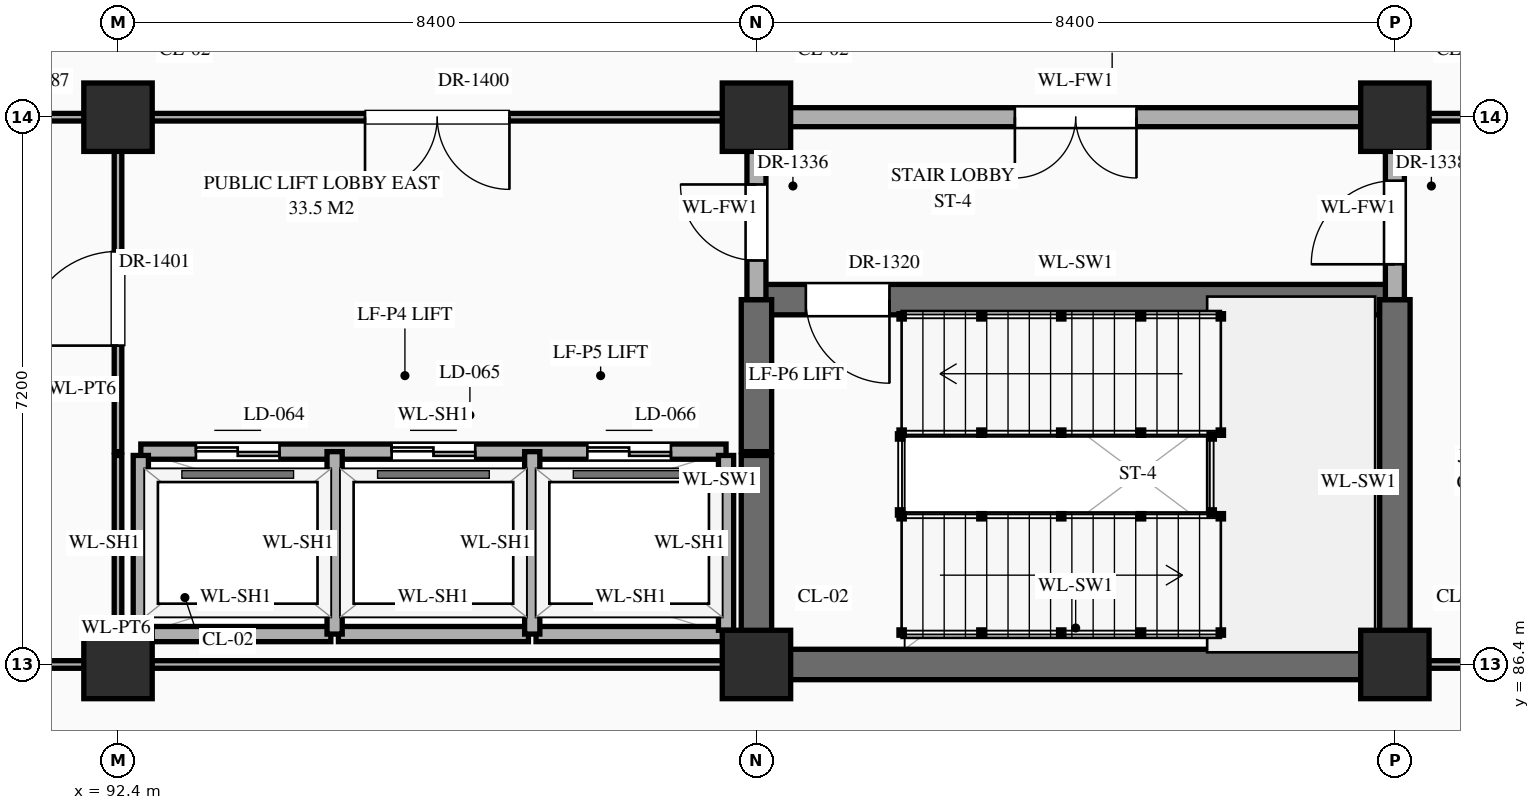
"""IFC4 building model, lengths in metres.
Left out: names, types, materials, properties, quantities, classifications, styles, units other than length and angle.
Written with IfcOpenShell. Run it as: python <this file> out.ifc"""

import sys

from ifc_helpers import new_model, si_unit, direction, frame, frame_2d, origin, origin_2d, place, context, subcontext, project, spatial, rectangle, extrude, element, fill, save


model = new_model("IFC4")
c1 = context("Model", 3, precision=1e-05, world=origin(), true_north=direction((0.0, 1.0)))
c2 = subcontext(c1, "Body", "Model", "MODEL_VIEW")
j1 = project(units=[si_unit("LENGTHUNIT", "METRE"), si_unit("PLANEANGLEUNIT", "RADIAN")], contexts=[c1])
p1 = place(None, origin())
s1 = spatial("IfcSite", under=j1, at=p1, CompositionType="ELEMENT")
p2 = place(p1, origin())
s2 = spatial("IfcBuilding", under=s1, at=p2, CompositionType="ELEMENT")
p3 = place(p2, frame((0.0, 0.0, 10.8)))
s3 = spatial("IfcBuildingStorey", under=s2, at=p3, CompositionType="ELEMENT", Elevation=10.8)
for number, where, z_axis, x_axis in (
    (1, (92.4, 86.4, 0.0), (0.0, 0.0, 1.0), (1.0, 0.0, 0.0)),
    (2, (92.4, 93.6, 0.0), (0.0, 0.0, 1.0), (1.0, 0.0, 0.0)),
    (3, (100.8, 86.4, 0.0), (0.0, 0.0, 1.0), (1.0, 0.0, 0.0)),
    (4, (100.8, 93.6, 0.0), (0.0, 0.0, 1.0), (1.0, 0.0, 0.0)),
    (5, (109.2, 86.4, 0.0), (0.0, 0.0, 1.0), (1.0, 0.0, 0.0)),
    (6, (109.2, 93.6, 0.0), (0.0, 0.0, 1.0), (1.0, 0.0, 0.0)),
):
    element("IfcColumn", number, at=place(p3, frame(where, z_axis=z_axis, x_axis=x_axis)), inside=s3, PredefinedType="COLUMN", context=c2, shape_type="SweptSolid", body=[
        extrude(rectangle(XDim=0.9, YDim=0.9, at=origin_2d()), origin(), (0.0, 0.0, 1.0), 5.4),
    ])
p4 = place(p3, frame((84.0, 86.4, 0.0), z_axis=(0.0, 0.0, 1.0), x_axis=(1.0, 0.0, 0.0)))
e7 = element("IfcWall", 7, at=p4, inside=s3, PredefinedType="STANDARD", context=c2, shape_type="SweptSolid", body=[
    extrude(rectangle(XDim=8.4, YDim=0.1, at=frame_2d((4.2, 0.0))), origin(), (0.0, 0.0, 1.0), 4.27),
])
p5 = place(p4, frame((1.075, 0.0, 0.0)))
e8 = element("IfcOpeningElement", 8, at=p5, cuts=e7, PredefinedType="OPENING", context=c2, shape_type="SweptSolid", body=[
    extrude(rectangle(XDim=1.02, YDim=2.4, at=frame_2d((0.51, 1.2))), frame((0.0, 0.062, 0.0), z_axis=(0.0, -1.0, 0.0), x_axis=(1.0, 0.0, 0.0)), (0.0, 0.0, 1.0), 0.124),
])
p6 = place(p4, frame((3.63, 0.0, 0.0)))
e9 = element("IfcOpeningElement", 9, at=p6, cuts=e7, PredefinedType="OPENING", context=c2, shape_type="SweptSolid", body=[
    extrude(rectangle(XDim=1.14, YDim=2.4, at=frame_2d((0.57, 1.2))), frame((0.0, 0.062, 0.0), z_axis=(0.0, -1.0, 0.0), x_axis=(1.0, 0.0, 0.0)), (0.0, 0.0, 1.0), 0.124),
])
p7 = place(p4, frame((6.365, 0.0, 0.0)))
e10 = element("IfcOpeningElement", 10, at=p7, cuts=e7, PredefinedType="OPENING", context=c2, shape_type="SweptSolid", body=[
    extrude(rectangle(XDim=0.9, YDim=2.15, at=frame_2d((0.45, 1.075))), frame((0.0, 0.062, 0.0), z_axis=(0.0, -1.0, 0.0), x_axis=(1.0, 0.0, 0.0)), (0.0, 0.0, 1.0), 0.124),
])
p8 = place(p3, frame((92.45, 86.4, 0.0), z_axis=(0.0, 0.0, 1.0), x_axis=(1.0, 0.0, 0.0)))
e11 = element("IfcWall", 11, at=p8, inside=s3, PredefinedType="STANDARD", context=c2, shape_type="SweptSolid", body=[
    extrude(rectangle(XDim=8.3, YDim=0.1, at=frame_2d((4.15, 0.0))), origin(), (0.0, 0.0, 1.0), 4.27),
])
p9 = place(p3, frame((100.8, 86.4, 0.0), z_axis=(0.0, 0.0, 1.0), x_axis=(1.0, 0.0, 0.0)))
e12 = element("IfcWall", 12, at=p9, inside=s3, PredefinedType="SHEAR", context=c2, shape_type="SweptSolid", body=[
    extrude(rectangle(XDim=8.4, YDim=0.4, at=frame_2d((4.2, 0.0))), origin(), (0.0, 0.0, 1.0), 5.12),
])
p10 = place(p3, frame((109.2, 86.4, 0.0), z_axis=(0.0, 0.0, 1.0), x_axis=(1.0, 0.0, 0.0)))
e13 = element("IfcWall", 13, at=p10, inside=s3, PredefinedType="STANDARD", context=c2, shape_type="SweptSolid", body=[
    extrude(rectangle(XDim=8.4, YDim=0.1, at=frame_2d((4.2, 0.0))), origin(), (0.0, 0.0, 1.0), 4.27),
])
p11 = place(p10, frame((1.125, 0.0, 0.0)))
e14 = element("IfcOpeningElement", 14, at=p11, cuts=e13, PredefinedType="OPENING", context=c2, shape_type="SweptSolid", body=[
    extrude(rectangle(XDim=0.92, YDim=2.15, at=frame_2d((0.46, 1.075))), frame((0.0, 0.062, 0.0), z_axis=(0.0, -1.0, 0.0), x_axis=(1.0, 0.0, 0.0)), (0.0, 0.0, 1.0), 0.124),
])
p12 = place(p10, frame((3.7, 0.0, 0.0)))
e15 = element("IfcOpeningElement", 15, at=p12, cuts=e13, PredefinedType="OPENING", context=c2, shape_type="SweptSolid", body=[
    extrude(rectangle(XDim=1.0, YDim=2.25, at=frame_2d((0.5, 1.125))), frame((0.0, 0.062, 0.0), z_axis=(0.0, -1.0, 0.0), x_axis=(1.0, 0.0, 0.0)), (0.0, 0.0, 1.0), 0.124),
])
p13 = place(p10, frame((6.295, 0.0, 0.0)))
e16 = element("IfcOpeningElement", 16, at=p13, cuts=e13, PredefinedType="OPENING", context=c2, shape_type="SweptSolid", body=[
    extrude(rectangle(XDim=1.04, YDim=2.2, at=frame_2d((0.52, 1.1))), frame((0.0, 0.062, 0.0), z_axis=(0.0, -1.0, 0.0), x_axis=(1.0, 0.0, 0.0)), (0.0, 0.0, 1.0), 0.124),
])
for number, where, z_axis, x_axis in (
    (17, (92.7, 86.8, 0.0), (0.0, 0.0, 1.0), (1.0, 0.0, 0.0)),
    (18, (95.3, 86.8, 0.0), (0.0, 0.0, 1.0), (1.0, 0.0, 0.0)),
    (19, (97.9, 86.8, 0.0), (0.0, 0.0, 1.0), (1.0, 0.0, 0.0)),
):
    element("IfcWall", number, at=place(p3, frame(where, z_axis=z_axis, x_axis=x_axis)), inside=s3, PredefinedType="STANDARD", context=c2, shape_type="SweptSolid", body=[
        extrude(rectangle(XDim=2.5, YDim=0.2, at=frame_2d((1.25, 0.0))), origin(), (0.0, 0.0, 1.0), 5.12),
    ])
p14 = place(p3, frame((92.7, 89.2, 0.0), z_axis=(0.0, 0.0, 1.0), x_axis=(1.0, 0.0, 0.0)))
e20 = element("IfcWall", 20, at=p14, inside=s3, PredefinedType="STANDARD", context=c2, shape_type="SweptSolid", body=[
    extrude(rectangle(XDim=7.7, YDim=0.2, at=frame_2d((3.85, 0.0))), origin(), (0.0, 0.0, 1.0), 5.12),
])
p15 = place(p14, frame((0.725, 0.0, 0.0)))
e21 = element("IfcOpeningElement", 21, at=p15, cuts=e20, PredefinedType="OPENING", context=c2, shape_type="SweptSolid", body=[
    extrude(rectangle(XDim=1.1, YDim=2.15, at=frame_2d((0.55, 1.075))), frame((0.0, 0.112, 0.0), z_axis=(0.0, -1.0, 0.0), x_axis=(1.0, 0.0, 0.0)), (0.0, 0.0, 1.0), 0.224),
])
p16 = place(p14, frame((3.3, 0.0, 0.0)))
e22 = element("IfcOpeningElement", 22, at=p16, cuts=e20, PredefinedType="OPENING", context=c2, shape_type="SweptSolid", body=[
    extrude(rectangle(XDim=1.1, YDim=2.15, at=frame_2d((0.55, 1.075))), frame((0.0, 0.112, 0.0), z_axis=(0.0, -1.0, 0.0), x_axis=(1.0, 0.0, 0.0)), (0.0, 0.0, 1.0), 0.224),
])
p17 = place(p14, frame((5.875, 0.0, 0.0)))
e23 = element("IfcOpeningElement", 23, at=p17, cuts=e20, PredefinedType="OPENING", context=c2, shape_type="SweptSolid", body=[
    extrude(rectangle(XDim=1.1, YDim=2.15, at=frame_2d((0.55, 1.075))), frame((0.0, 0.112, 0.0), z_axis=(0.0, -1.0, 0.0), x_axis=(1.0, 0.0, 0.0)), (0.0, 0.0, 1.0), 0.224),
])
p18 = place(p3, frame((100.8, 91.2, 0.0), z_axis=(0.0, 0.0, 1.0), x_axis=(1.0, 0.0, 0.0)))
e24 = element("IfcWall", 24, at=p18, inside=s3, PredefinedType="SHEAR", context=c2, shape_type="SweptSolid", body=[
    extrude(rectangle(XDim=8.4, YDim=0.4, at=frame_2d((4.2, 0.0))), origin(), (0.0, 0.0, 1.0), 5.12),
])
p19 = place(p18, frame((0.65, 0.0, 0.0)))
e25 = element("IfcOpeningElement", 25, at=p19, cuts=e24, PredefinedType="OPENING", context=c2, shape_type="SweptSolid", body=[
    extrude(rectangle(XDim=1.1, YDim=2.2, at=frame_2d((0.55, 1.1))), frame((0.0, 0.212, 0.0), z_axis=(0.0, -1.0, 0.0), x_axis=(1.0, 0.0, 0.0)), (0.0, 0.0, 1.0), 0.424),
])
p20 = place(p3, frame((67.2, 93.6, 0.0), z_axis=(0.0, 0.0, 1.0), x_axis=(1.0, 0.0, 0.0)))
e26 = element("IfcWall", 26, at=p20, inside=s3, PredefinedType="STANDARD", context=c2, shape_type="SweptSolid", body=[
    extrude(rectangle(XDim=33.6, YDim=0.1, at=frame_2d((16.8, 0.0))), origin(), (0.0, 0.0, 1.0), 4.27),
])
p21 = place(p20, frame((3.475, 0.0, 0.0)))
e27 = element("IfcOpeningElement", 27, at=p21, cuts=e26, PredefinedType="OPENING", context=c2, shape_type="SweptSolid", body=[
    extrude(rectangle(XDim=1.45, YDim=2.3, at=frame_2d((0.725, 1.15))), frame((0.0, 0.062, 0.0), z_axis=(0.0, -1.0, 0.0), x_axis=(1.0, 0.0, 0.0)), (0.0, 0.0, 1.0), 0.124),
])
p22 = place(p20, frame((28.45, 0.0, 0.0)))
e28 = element("IfcOpeningElement", 28, at=p22, cuts=e26, PredefinedType="OPENING", context=c2, shape_type="SweptSolid", body=[
    extrude(rectangle(XDim=1.9, YDim=2.5, at=frame_2d((0.95, 1.25))), frame((0.0, 0.062, 0.0), z_axis=(0.0, -1.0, 0.0), x_axis=(1.0, 0.0, 0.0)), (0.0, 0.0, 1.0), 0.124),
])
p23 = place(p20, frame((11.825, 0.0, 0.0)))
e29 = element("IfcOpeningElement", 29, at=p23, cuts=e26, PredefinedType="OPENING", context=c2, shape_type="SweptSolid", body=[
    extrude(rectangle(XDim=1.55, YDim=2.35, at=frame_2d((0.775, 1.175))), frame((0.0, 0.062, 0.0), z_axis=(0.0, -1.0, 0.0), x_axis=(1.0, 0.0, 0.0)), (0.0, 0.0, 1.0), 0.124),
])
p24 = place(p20, frame((17.785, 0.0, 0.0)))
e30 = element("IfcOpeningElement", 30, at=p24, cuts=e26, PredefinedType="OPENING", context=c2, shape_type="SweptSolid", body=[
    extrude(rectangle(XDim=1.2, YDim=2.35, at=frame_2d((0.6, 1.175))), frame((0.0, 0.062, 0.0), z_axis=(0.0, -1.0, 0.0), x_axis=(1.0, 0.0, 0.0)), (0.0, 0.0, 1.0), 0.124),
])
p25 = place(p20, frame((20.38, 0.0, 0.0)))
e31 = element("IfcOpeningElement", 31, at=p25, cuts=e26, PredefinedType="OPENING", context=c2, shape_type="SweptSolid", body=[
    extrude(rectangle(XDim=1.24, YDim=2.3, at=frame_2d((0.62, 1.15))), frame((0.0, 0.062, 0.0), z_axis=(0.0, -1.0, 0.0), x_axis=(1.0, 0.0, 0.0)), (0.0, 0.0, 1.0), 0.124),
])
p26 = place(p20, frame((22.975, 0.0, 0.0)))
e32 = element("IfcOpeningElement", 32, at=p26, cuts=e26, PredefinedType="OPENING", context=c2, shape_type="SweptSolid", body=[
    extrude(rectangle(XDim=1.28, YDim=2.35, at=frame_2d((0.64, 1.175))), frame((0.0, 0.062, 0.0), z_axis=(0.0, -1.0, 0.0), x_axis=(1.0, 0.0, 0.0)), (0.0, 0.0, 1.0), 0.124),
])
p27 = place(p3, frame((100.8, 93.6, 0.0), z_axis=(0.0, 0.0, 1.0), x_axis=(1.0, 0.0, 0.0)))
e33 = element("IfcWall", 33, at=p27, inside=s3, PredefinedType="STANDARD", context=c2, shape_type="SweptSolid", body=[
    extrude(rectangle(XDim=8.4, YDim=0.25, at=frame_2d((4.2, 0.0))), origin(), (0.0, 0.0, 1.0), 4.27),
])
p28 = place(p27, frame((3.4, 0.0, 0.0)))
e34 = element("IfcOpeningElement", 34, at=p28, cuts=e33, PredefinedType="OPENING", context=c2, shape_type="SweptSolid", body=[
    extrude(rectangle(XDim=1.6, YDim=2.3, at=frame_2d((0.8, 1.15))), frame((0.0, 0.137, 0.0), z_axis=(0.0, -1.0, 0.0), x_axis=(1.0, 0.0, 0.0)), (0.0, 0.0, 1.0), 0.274),
])
p29 = place(p3, frame((109.2, 93.6, 0.0), z_axis=(0.0, 0.0, 1.0), x_axis=(1.0, 0.0, 0.0)))
e35 = element("IfcWall", 35, at=p29, inside=s3, PredefinedType="STANDARD", context=c2, shape_type="SweptSolid", body=[
    extrude(rectangle(XDim=8.4, YDim=0.1, at=frame_2d((4.2, 0.0))), origin(), (0.0, 0.0, 1.0), 4.27),
])
p30 = place(p29, frame((1.115, 0.0, 0.0)))
e36 = element("IfcOpeningElement", 36, at=p30, cuts=e35, PredefinedType="OPENING", context=c2, shape_type="SweptSolid", body=[
    extrude(rectangle(XDim=0.94, YDim=2.3, at=frame_2d((0.47, 1.15))), frame((0.0, 0.062, 0.0), z_axis=(0.0, -1.0, 0.0), x_axis=(1.0, 0.0, 0.0)), (0.0, 0.0, 1.0), 0.124),
])
p31 = place(p29, frame((3.71, 0.0, 0.0)))
e37 = element("IfcOpeningElement", 37, at=p31, cuts=e35, PredefinedType="OPENING", context=c2, shape_type="SweptSolid", body=[
    extrude(rectangle(XDim=0.98, YDim=2.35, at=frame_2d((0.49, 1.175))), frame((0.0, 0.062, 0.0), z_axis=(0.0, -1.0, 0.0), x_axis=(1.0, 0.0, 0.0)), (0.0, 0.0, 1.0), 0.124),
])
p32 = place(p29, frame((6.305, 0.0, 0.0)))
e38 = element("IfcOpeningElement", 38, at=p32, cuts=e35, PredefinedType="OPENING", context=c2, shape_type="SweptSolid", body=[
    extrude(rectangle(XDim=1.02, YDim=2.4, at=frame_2d((0.51, 1.2))), frame((0.0, 0.062, 0.0), z_axis=(0.0, -1.0, 0.0), x_axis=(1.0, 0.0, 0.0)), (0.0, 0.0, 1.0), 0.124),
])
p33 = place(p3, frame((92.4, 86.45, 0.0), z_axis=(0.0, 0.0, 1.0), x_axis=(0.0, 1.0, 0.0)))
e39 = element("IfcWall", 39, at=p33, inside=s3, PredefinedType="STANDARD", context=c2, shape_type="SweptSolid", body=[
    extrude(rectangle(XDim=2.7, YDim=0.1, at=frame_2d((1.35, 0.0))), origin(), (0.0, 0.0, 1.0), 4.37),
])
p34 = place(p3, frame((92.4, 89.2, 0.0), z_axis=(0.0, 0.0, 1.0), x_axis=(0.0, 1.0, 0.0)))
e40 = element("IfcWall", 40, at=p34, inside=s3, PredefinedType="STANDARD", context=c2, shape_type="SweptSolid", body=[
    extrude(rectangle(XDim=4.4, YDim=0.1, at=frame_2d((2.2, 0.0))), origin(), (0.0, 0.0, 1.0), 4.37),
])
p35 = place(p34, frame((1.395, 0.0, 0.0)))
e41 = element("IfcOpeningElement", 41, at=p35, cuts=e40, PredefinedType="OPENING", context=c2, shape_type="SweptSolid", body=[
    extrude(rectangle(XDim=1.24, YDim=2.3, at=frame_2d((0.62, 1.15))), frame((0.0, 0.062, 0.0), z_axis=(0.0, -1.0, 0.0), x_axis=(1.0, 0.0, 0.0)), (0.0, 0.0, 1.0), 0.124),
])
p36 = place(p3, frame((92.7, 86.85, 0.0), z_axis=(0.0, 0.0, 1.0), x_axis=(0.0, 1.0, 0.0)))
e42 = element("IfcWall", 42, at=p36, inside=s3, PredefinedType="STANDARD", context=c2, shape_type="SweptSolid", body=[
    extrude(rectangle(XDim=2.3, YDim=0.2, at=frame_2d((1.15, 0.0))), origin(), (0.0, 0.0, 1.0), 5.12),
])
for number, where, z_axis, x_axis in (
    (43, (95.25, 86.8, 0.0), (0.0, 0.0, 1.0), (0.0, 1.0, 0.0)),
    (44, (97.85, 86.8, 0.0), (0.0, 0.0, 1.0), (0.0, 1.0, 0.0)),
):
    element("IfcWall", number, at=place(p3, frame(where, z_axis=z_axis, x_axis=x_axis)), inside=s3, PredefinedType="STANDARD", context=c2, shape_type="SweptSolid", body=[
        extrude(rectangle(XDim=2.4, YDim=0.2, at=frame_2d((1.2, 0.0))), origin(), (0.0, 0.0, 1.0), 5.12),
    ])
p37 = place(p3, frame((100.4, 86.85, 0.0), z_axis=(0.0, 0.0, 1.0), x_axis=(0.0, 1.0, 0.0)))
e45 = element("IfcWall", 45, at=p37, inside=s3, PredefinedType="STANDARD", context=c2, shape_type="SweptSolid", body=[
    extrude(rectangle(XDim=2.3, YDim=0.2, at=frame_2d((1.15, 0.0))), origin(), (0.0, 0.0, 1.0), 5.12),
])
p38 = place(p3, frame((100.8, 86.45, 0.0), z_axis=(0.0, 0.0, 1.0), x_axis=(0.0, 1.0, 0.0)))
e46 = element("IfcWall", 46, at=p38, inside=s3, PredefinedType="SHEAR", context=c2, shape_type="SweptSolid", body=[
    extrude(rectangle(XDim=2.7, YDim=0.4, at=frame_2d((1.35, 0.0))), origin(), (0.0, 0.0, 1.0), 5.12),
])
p39 = place(p3, frame((100.8, 89.2, 0.0), z_axis=(0.0, 0.0, 1.0), x_axis=(0.0, 1.0, 0.0)))
e47 = element("IfcWall", 47, at=p39, inside=s3, PredefinedType="SHEAR", context=c2, shape_type="SweptSolid", body=[
    extrude(rectangle(XDim=2.0, YDim=0.4, at=frame_2d((1.0, 0.0))), origin(), (0.0, 0.0, 1.0), 5.12),
])
p40 = place(p3, frame((100.8, 91.2, 0.0), z_axis=(0.0, 0.0, 1.0), x_axis=(0.0, 1.0, 0.0)))
e48 = element("IfcWall", 48, at=p40, inside=s3, PredefinedType="STANDARD", context=c2, shape_type="SweptSolid", body=[
    extrude(rectangle(XDim=2.4, YDim=0.25, at=frame_2d((1.2, 0.0))), origin(), (0.0, 0.0, 1.0), 4.37),
])
p41 = place(p40, frame((0.515, 0.0, 0.0)))
e49 = element("IfcOpeningElement", 49, at=p41, cuts=e48, PredefinedType="OPENING", context=c2, shape_type="SweptSolid", body=[
    extrude(rectangle(XDim=1.0, YDim=2.2, at=frame_2d((0.5, 1.1))), frame((0.0, 0.137, 0.0), z_axis=(0.0, -1.0, 0.0), x_axis=(1.0, 0.0, 0.0)), (0.0, 0.0, 1.0), 0.274),
])
p42 = place(p3, frame((109.2, 86.4, 0.0), z_axis=(0.0, 0.0, 1.0), x_axis=(0.0, 1.0, 0.0)))
e50 = element("IfcWall", 50, at=p42, inside=s3, PredefinedType="SHEAR", context=c2, shape_type="SweptSolid", body=[
    extrude(rectangle(XDim=4.8, YDim=0.4, at=frame_2d((2.4, 0.0))), origin(), (0.0, 0.0, 1.0), 5.12),
])
p43 = place(p3, frame((109.2, 91.2, 0.0), z_axis=(0.0, 0.0, 1.0), x_axis=(0.0, 1.0, 0.0)))
e51 = element("IfcWall", 51, at=p43, inside=s3, PredefinedType="STANDARD", context=c2, shape_type="SweptSolid", body=[
    extrude(rectangle(XDim=2.4, YDim=0.25, at=frame_2d((1.2, 0.0))), origin(), (0.0, 0.0, 1.0), 4.37),
])
p44 = place(p43, frame((0.465, 0.0, 0.0)))
e52 = element("IfcOpeningElement", 52, at=p44, cuts=e51, PredefinedType="OPENING", context=c2, shape_type="SweptSolid", body=[
    extrude(rectangle(XDim=1.1, YDim=2.2, at=frame_2d((0.55, 1.1))), frame((0.0, 0.137, 0.0), z_axis=(0.0, -1.0, 0.0), x_axis=(1.0, 0.0, 0.0)), (0.0, 0.0, 1.0), 0.274),
])
p45 = place(p15, origin())
e53 = element("IfcDoor", 53, at=p45, inside=s3, OperationType="DOUBLE_DOOR_SLIDING", PredefinedType="DOOR", context=c2, shape_type="SweptSolid", body=[
    extrude(rectangle(XDim=1.1, YDim=2.15, at=frame_2d((0.55, 1.075))), frame((0.0, 0.025, 0.0), z_axis=(0.0, -1.0, 0.0), x_axis=(1.0, 0.0, 0.0)), (0.0, 0.0, 1.0), 0.05),
])
fill(e21, e53)
p46 = place(p16, origin())
e54 = element("IfcDoor", 54, at=p46, inside=s3, OperationType="DOUBLE_DOOR_SLIDING", PredefinedType="DOOR", context=c2, shape_type="SweptSolid", body=[
    extrude(rectangle(XDim=1.1, YDim=2.15, at=frame_2d((0.55, 1.075))), frame((0.0, 0.025, 0.0), z_axis=(0.0, -1.0, 0.0), x_axis=(1.0, 0.0, 0.0)), (0.0, 0.0, 1.0), 0.05),
])
fill(e22, e54)
p47 = place(p17, origin())
e55 = element("IfcDoor", 55, at=p47, inside=s3, OperationType="DOUBLE_DOOR_SLIDING", PredefinedType="DOOR", context=c2, shape_type="SweptSolid", body=[
    extrude(rectangle(XDim=1.1, YDim=2.15, at=frame_2d((0.55, 1.075))), frame((0.0, 0.025, 0.0), z_axis=(0.0, -1.0, 0.0), x_axis=(1.0, 0.0, 0.0)), (0.0, 0.0, 1.0), 0.05),
])
fill(e23, e55)
p48 = place(p19, frame((1.1, 0.0, 0.0), z_axis=(0.0, 0.0, 1.0), x_axis=(-1.0, 0.0, 0.0)))
e56 = element("IfcDoor", 56, at=p48, inside=s3, OperationType="SINGLE_SWING_LEFT", PredefinedType="DOOR", context=c2, shape_type="SweptSolid", body=[
    extrude(rectangle(XDim=1.1, YDim=2.2, at=frame_2d((0.55, 1.1))), frame((0.0, 0.025, 0.0), z_axis=(0.0, -1.0, 0.0), x_axis=(1.0, 0.0, 0.0)), (0.0, 0.0, 1.0), 0.05),
])
fill(e25, e56)
p49 = place(p41, origin())
e57 = element("IfcDoor", 57, at=p49, inside=s3, OperationType="SINGLE_SWING_RIGHT", PredefinedType="DOOR", context=c2, shape_type="SweptSolid", body=[
    extrude(rectangle(XDim=1.0, YDim=2.2, at=frame_2d((0.5, 1.1))), frame((0.0, 0.025, 0.0), z_axis=(0.0, -1.0, 0.0), x_axis=(1.0, 0.0, 0.0)), (0.0, 0.0, 1.0), 0.05),
])
fill(e49, e57)
p50 = place(p28, frame((1.6, 0.0, 0.0), z_axis=(0.0, 0.0, 1.0), x_axis=(-1.0, 0.0, 0.0)))
e58 = element("IfcDoor", 58, at=p50, inside=s3, OperationType="DOUBLE_DOOR_SINGLE_SWING", PredefinedType="DOOR", context=c2, shape_type="SweptSolid", body=[
    extrude(rectangle(XDim=1.6, YDim=2.3, at=frame_2d((0.8, 1.15))), frame((0.0, 0.025, 0.0), z_axis=(0.0, -1.0, 0.0), x_axis=(1.0, 0.0, 0.0)), (0.0, 0.0, 1.0), 0.05),
])
fill(e34, e58)
p51 = place(p44, origin())
e59 = element("IfcDoor", 59, at=p51, inside=s3, OperationType="SINGLE_SWING_LEFT", PredefinedType="DOOR", context=c2, shape_type="SweptSolid", body=[
    extrude(rectangle(XDim=1.1, YDim=2.2, at=frame_2d((0.55, 1.1))), frame((0.0, 0.025, 0.0), z_axis=(0.0, -1.0, 0.0), x_axis=(1.0, 0.0, 0.0)), (0.0, 0.0, 1.0), 0.05),
])
fill(e52, e59)
p52 = place(p22, frame((1.9, 0.0, 0.0), z_axis=(0.0, 0.0, 1.0), x_axis=(-1.0, 0.0, 0.0)))
e60 = element("IfcDoor", 60, at=p52, inside=s3, OperationType="DOUBLE_DOOR_SINGLE_SWING", PredefinedType="DOOR", context=c2, shape_type="SweptSolid", body=[
    extrude(rectangle(XDim=1.9, YDim=2.5, at=frame_2d((0.95, 1.25))), frame((0.0, 0.025, 0.0), z_axis=(0.0, -1.0, 0.0), x_axis=(1.0, 0.0, 0.0)), (0.0, 0.0, 1.0), 0.05),
])
fill(e28, e60)
p53 = place(p35, origin())
e61 = element("IfcDoor", 61, at=p53, inside=s3, OperationType="SINGLE_SWING_LEFT", PredefinedType="DOOR", context=c2, shape_type="SweptSolid", body=[
    extrude(rectangle(XDim=1.24, YDim=2.3, at=frame_2d((0.62, 1.15))), frame((0.0, 0.025, 0.0), z_axis=(0.0, -1.0, 0.0), x_axis=(1.0, 0.0, 0.0)), (0.0, 0.0, 1.0), 0.05),
])
fill(e41, e61)
save(model, sys.argv[1])
